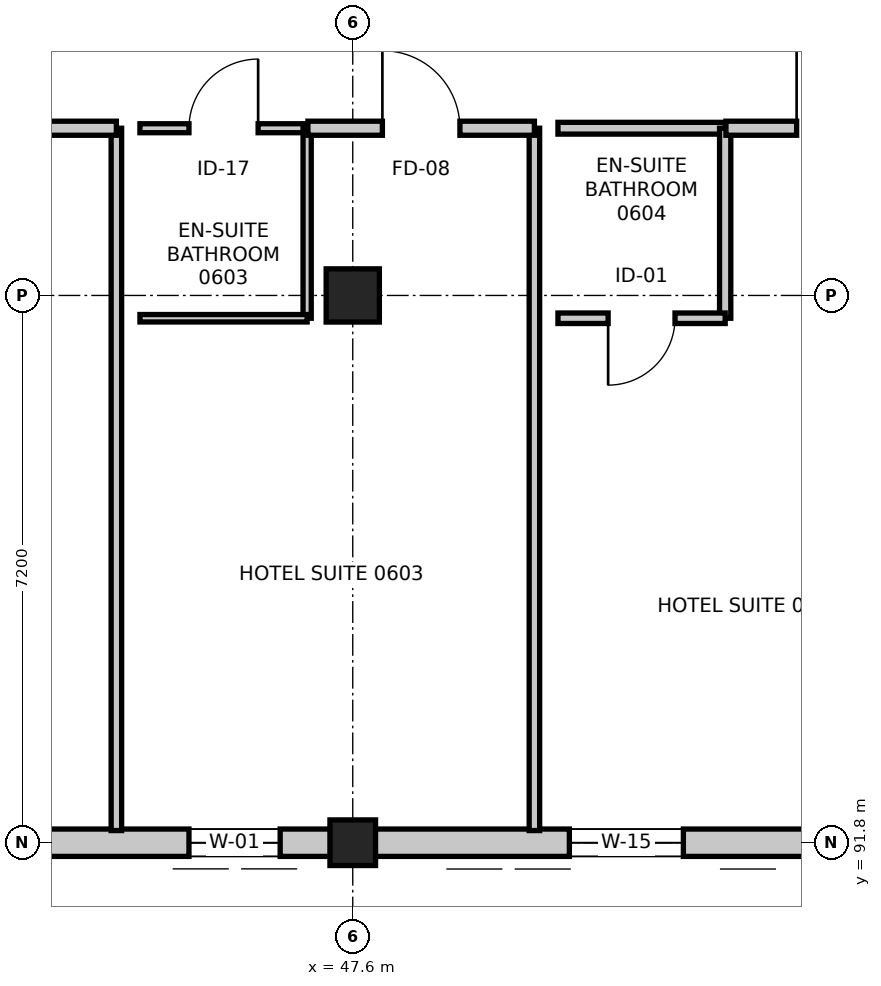
"""IFC4 building model, lengths in metres.
Left out: names, types, materials, properties, quantities, classifications, styles, units other than length and angle.
Written with IfcOpenShell. Run it as: python <this file> out.ifc"""

import sys

from ifc_helpers import new_model, si_unit, direction, frame, frame_2d, origin, origin_2d, place, context, subcontext, project, spatial, rectangle, extrude, element, fill, save


model = new_model("IFC4")
c1 = context("Model", 3, precision=1e-05, world=origin(), true_north=direction((0.0, 1.0)))
c2 = subcontext(c1, "Body", "Model", "MODEL_VIEW")
j1 = project(units=[si_unit("LENGTHUNIT", "METRE"), si_unit("PLANEANGLEUNIT", "RADIAN")], contexts=[c1])
p1 = place(None, origin())
s1 = spatial("IfcSite", under=j1, at=p1, CompositionType="ELEMENT")
p2 = place(p1, origin())
s2 = spatial("IfcBuilding", under=s1, at=p2, CompositionType="ELEMENT")
p3 = place(p2, frame((0.0, 0.0, 26.4)))
s3 = spatial("IfcBuildingStorey", under=s2, at=p3, CompositionType="ELEMENT", Elevation=26.4)
p4 = place(p3, frame((47.6, 91.8, 0.0), z_axis=(0.0, 0.0, 1.0), x_axis=(1.0, 0.0, 0.0)))
e1 = element("IfcColumn", 1, at=p4, inside=s3, PredefinedType="COLUMN", context=c2, shape_type="SweptSolid", body=[
    extrude(rectangle(XDim=0.6, YDim=0.6, at=origin_2d()), origin(), (0.0, 0.0, 1.0), 3.6),
])
p5 = place(p3, frame((47.6, 99.0, 0.0), z_axis=(0.0, 0.0, 1.0), x_axis=(1.0, 0.0, 0.0)))
e2 = element("IfcColumn", 2, at=p5, inside=s3, PredefinedType="COLUMN", context=c2, shape_type="SweptSolid", body=[
    extrude(rectangle(XDim=0.7, YDim=0.7, at=origin_2d()), origin(), (0.0, 0.0, 1.0), 3.6),
])
p6 = place(p3, frame((54.8, 91.8, 0.0), z_axis=(0.0, 0.0, 1.0), x_axis=(-1.0, 0.0, 0.0)))
e3 = element("IfcWall", 3, at=p6, inside=s3, PredefinedType="STANDARD", context=c2, shape_type="SweptSolid", body=[
    extrude(rectangle(XDim=7.2, YDim=0.36, at=frame_2d((3.6, 0.0))), origin(), (0.0, 0.0, 1.0), 2.735),
])
p7 = place(p6, frame((2.85, 0.0, 0.75)))
e4 = element("IfcOpeningElement", 4, at=p7, cuts=e3, PredefinedType="OPENING", context=c2, shape_type="SweptSolid", body=[
    extrude(rectangle(XDim=1.5, YDim=1.5, at=frame_2d((0.75, 0.75))), frame((0.0, 0.19, 0.0), z_axis=(0.0, -1.0, 0.0), x_axis=(1.0, 0.0, 0.0)), (0.0, 0.0, 1.0), 0.38),
])
p8 = place(p3, frame((47.6, 91.8, 0.0), z_axis=(0.0, 0.0, 1.0), x_axis=(-1.0, 0.0, 0.0)))
e5 = element("IfcWall", 5, at=p8, inside=s3, PredefinedType="STANDARD", context=c2, shape_type="SweptSolid", body=[
    extrude(rectangle(XDim=7.2, YDim=0.36, at=frame_2d((3.6, 0.0))), origin(), (0.0, 0.0, 1.0), 2.735),
])
p9 = place(p8, frame((0.955, 0.0, 0.75)))
e6 = element("IfcOpeningElement", 6, at=p9, cuts=e5, PredefinedType="OPENING", context=c2, shape_type="SweptSolid", body=[
    extrude(rectangle(XDim=1.2, YDim=1.5, at=frame_2d((0.6, 0.75))), frame((0.0, 0.19, 0.0), z_axis=(0.0, -1.0, 0.0), x_axis=(1.0, 0.0, 0.0)), (0.0, 0.0, 1.0), 0.38),
])
p10 = place(p8, frame((4.555, 0.0, 0.75)))
e7 = element("IfcOpeningElement", 7, at=p10, cuts=e5, PredefinedType="OPENING", context=c2, shape_type="SweptSolid", body=[
    extrude(rectangle(XDim=1.2, YDim=1.5, at=frame_2d((0.6, 0.75))), frame((0.0, 0.19, 0.0), z_axis=(0.0, -1.0, 0.0), x_axis=(1.0, 0.0, 0.0)), (0.0, 0.0, 1.0), 0.38),
])
p11 = place(p3, frame((44.49, 101.2, 0.0), z_axis=(0.0, 0.0, 1.0), x_axis=(0.0, -1.0, 0.0)))
e8 = element("IfcWall", 8, at=p11, inside=s3, PredefinedType="PARTITIONING", context=c2, shape_type="SweptSolid", body=[
    extrude(rectangle(XDim=9.24, YDim=0.138, at=frame_2d((4.62, 0.0))), origin(), (0.0, 0.0, 1.0), 2.735),
])
p12 = place(p3, frame((41.51, 101.2, 0.0), z_axis=(0.0, 0.0, 1.0), x_axis=(1.0, 0.0, 0.0)))
e9 = element("IfcWall", 9, at=p12, inside=s3, PredefinedType="PARTITIONING", context=c2, shape_type="SweptSolid", body=[
    extrude(rectangle(XDim=2.98, YDim=0.185, at=frame_2d((1.49, 0.0))), origin(), (0.0, 0.0, 1.0), 3.35),
])
p13 = place(p12, frame((1.015, 0.0, 0.0)))
e10 = element("IfcOpeningElement", 10, at=p13, cuts=e9, PredefinedType="OPENING", context=c2, shape_type="SweptSolid", body=[
    extrude(rectangle(XDim=0.95, YDim=2.1, at=frame_2d((0.475, 1.05))), frame((0.0, 0.103, 0.0), z_axis=(0.0, -1.0, 0.0), x_axis=(1.0, 0.0, 0.0)), (0.0, 0.0, 1.0), 0.205),
])
p14 = place(p3, frame((44.8, 101.2, 0.0), z_axis=(0.0, 0.0, 1.0), x_axis=(1.0, 0.0, 0.0)))
e11 = element("IfcWall", 11, at=p14, inside=s3, PredefinedType="PARTITIONING", context=c2, shape_type="SweptSolid", body=[
    extrude(rectangle(XDim=2.2, YDim=0.118, at=frame_2d((1.1, 0.0))), origin(), (0.0, 0.0, 1.0), 3.35),
])
p15 = place(p14, frame((0.645, 0.0, 0.0)))
e12 = element("IfcOpeningElement", 12, at=p15, cuts=e11, PredefinedType="OPENING", context=c2, shape_type="SweptSolid", body=[
    extrude(rectangle(XDim=0.91, YDim=2.11, at=frame_2d((0.455, 1.055))), frame((0.0, 0.069, 0.0), z_axis=(0.0, -1.0, 0.0), x_axis=(1.0, 0.0, 0.0)), (0.0, 0.0, 1.0), 0.138),
])
p16 = place(p3, frame((47.0, 101.2, 0.0), z_axis=(0.0, 0.0, 1.0), x_axis=(0.0, -1.0, 0.0)))
e13 = element("IfcWall", 13, at=p16, inside=s3, PredefinedType="PARTITIONING", context=c2, shape_type="SweptSolid", body=[
    extrude(rectangle(XDim=2.5, YDim=0.108, at=frame_2d((1.25, 0.0))), origin(), (0.0, 0.0, 1.0), 2.735),
])
p17 = place(p3, frame((47.0, 98.7, 0.0), z_axis=(0.0, 0.0, 1.0), x_axis=(-1.0, 0.0, 0.0)))
e14 = element("IfcWall", 14, at=p17, inside=s3, PredefinedType="PARTITIONING", context=c2, shape_type="SweptSolid", body=[
    extrude(rectangle(XDim=2.2, YDim=0.098, at=frame_2d((1.1, 0.0))), origin(), (0.0, 0.0, 1.0), 3.35),
])
p18 = place(p3, frame((49.99, 101.2, 0.0), z_axis=(0.0, 0.0, 1.0), x_axis=(0.0, -1.0, 0.0)))
e15 = element("IfcWall", 15, at=p18, inside=s3, PredefinedType="PARTITIONING", context=c2, shape_type="SweptSolid", body=[
    extrude(rectangle(XDim=9.24, YDim=0.138, at=frame_2d((4.62, 0.0))), origin(), (0.0, 0.0, 1.0), 2.735),
])
p19 = place(p3, frame((47.01, 101.2, 0.0), z_axis=(0.0, 0.0, 1.0), x_axis=(1.0, 0.0, 0.0)))
e16 = element("IfcWall", 16, at=p19, inside=s3, PredefinedType="PARTITIONING", context=c2, shape_type="SweptSolid", body=[
    extrude(rectangle(XDim=2.98, YDim=0.185, at=frame_2d((1.49, 0.0))), origin(), (0.0, 0.0, 1.0), 2.685),
])
p20 = place(p19, frame((0.98, 0.0, 0.0)))
e17 = element("IfcOpeningElement", 17, at=p20, cuts=e16, PredefinedType="OPENING", context=c2, shape_type="SweptSolid", body=[
    extrude(rectangle(XDim=1.02, YDim=2.15, at=frame_2d((0.51, 1.075))), frame((0.0, 0.103, 0.0), z_axis=(0.0, -1.0, 0.0), x_axis=(1.0, 0.0, 0.0)), (0.0, 0.0, 1.0), 0.205),
])
p21 = place(p3, frame((50.3, 101.2, 0.0), z_axis=(0.0, 0.0, 1.0), x_axis=(1.0, 0.0, 0.0)))
e18 = element("IfcWall", 18, at=p21, inside=s3, PredefinedType="PARTITIONING", context=c2, shape_type="SweptSolid", body=[
    extrude(rectangle(XDim=2.2, YDim=0.155, at=frame_2d((1.1, 0.0))), origin(), (0.0, 0.0, 1.0), 3.35),
])
p22 = place(p3, frame((52.5, 101.2, 0.0), z_axis=(0.0, 0.0, 1.0), x_axis=(0.0, -1.0, 0.0)))
e19 = element("IfcWall", 19, at=p22, inside=s3, PredefinedType="PARTITIONING", context=c2, shape_type="SweptSolid", body=[
    extrude(rectangle(XDim=2.5, YDim=0.148, at=frame_2d((1.25, 0.0))), origin(), (0.0, 0.0, 1.0), 2.735),
])
p23 = place(p3, frame((52.5, 98.7, 0.0), z_axis=(0.0, 0.0, 1.0), x_axis=(-1.0, 0.0, 0.0)))
e20 = element("IfcWall", 20, at=p23, inside=s3, PredefinedType="PARTITIONING", context=c2, shape_type="SweptSolid", body=[
    extrude(rectangle(XDim=2.2, YDim=0.138, at=frame_2d((1.1, 0.0))), origin(), (0.0, 0.0, 1.0), 3.35),
])
p24 = place(p23, frame((0.66, 0.0, 0.0)))
e21 = element("IfcOpeningElement", 21, at=p24, cuts=e20, PredefinedType="OPENING", context=c2, shape_type="SweptSolid", body=[
    extrude(rectangle(XDim=0.88, YDim=2.06, at=frame_2d((0.44, 1.03))), frame((0.0, 0.079, 0.0), z_axis=(0.0, -1.0, 0.0), x_axis=(1.0, 0.0, 0.0)), (0.0, 0.0, 1.0), 0.158),
])
p25 = place(p3, frame((52.51, 101.2, 0.0), z_axis=(0.0, 0.0, 1.0), x_axis=(1.0, 0.0, 0.0)))
e22 = element("IfcWall", 22, at=p25, inside=s3, PredefinedType="PARTITIONING", context=c2, shape_type="SweptSolid", body=[
    extrude(rectangle(XDim=2.98, YDim=0.185, at=frame_2d((1.49, 0.0))), origin(), (0.0, 0.0, 1.0), 2.685),
])
p26 = place(p25, frame((0.93, 0.0, 0.0)))
e23 = element("IfcOpeningElement", 23, at=p26, cuts=e22, PredefinedType="OPENING", context=c2, shape_type="SweptSolid", body=[
    extrude(rectangle(XDim=1.12, YDim=2.2, at=frame_2d((0.56, 1.1))), frame((0.0, 0.103, 0.0), z_axis=(0.0, -1.0, 0.0), x_axis=(1.0, 0.0, 0.0)), (0.0, 0.0, 1.0), 0.205),
])
p27 = place(p7, origin())
e24 = element("IfcWindow", 24, at=p27, inside=s3, PartitioningType="SINGLE_PANEL", PredefinedType="WINDOW", context=c2, shape_type="SweptSolid", body=[
    extrude(rectangle(XDim=1.5, YDim=1.5, at=frame_2d((0.75, 0.75))), frame((0.0, 0.03, 0.0), z_axis=(0.0, -1.0, 0.0), x_axis=(1.0, 0.0, 0.0)), (0.0, 0.0, 1.0), 0.06),
])
fill(e4, e24)
p28 = place(p9, origin())
e25 = element("IfcWindow", 25, at=p28, inside=s3, PartitioningType="SINGLE_PANEL", PredefinedType="WINDOW", context=c2, shape_type="SweptSolid", body=[
    extrude(rectangle(XDim=1.2, YDim=1.5, at=frame_2d((0.6, 0.75))), frame((0.0, 0.03, 0.0), z_axis=(0.0, -1.0, 0.0), x_axis=(1.0, 0.0, 0.0)), (0.0, 0.0, 1.0), 0.06),
])
fill(e6, e25)
p29 = place(p15, origin())
e26 = element("IfcDoor", 26, at=p29, inside=s3, OperationType="SINGLE_SWING_RIGHT", PredefinedType="DOOR", context=c2, shape_type="SweptSolid", body=[
    extrude(rectangle(XDim=0.91, YDim=2.11, at=frame_2d((0.455, 1.055))), frame((0.0, 0.025, 0.0), z_axis=(0.0, -1.0, 0.0), x_axis=(1.0, 0.0, 0.0)), (0.0, 0.0, 1.0), 0.05),
])
fill(e12, e26)
p30 = place(p20, origin())
e27 = element("IfcDoor", 27, at=p30, inside=s3, OperationType="SINGLE_SWING_LEFT", PredefinedType="DOOR", context=c2, shape_type="SweptSolid", body=[
    extrude(rectangle(XDim=1.02, YDim=2.15, at=frame_2d((0.51, 1.075))), frame((0.0, 0.025, 0.0), z_axis=(0.0, -1.0, 0.0), x_axis=(1.0, 0.0, 0.0)), (0.0, 0.0, 1.0), 0.05),
])
fill(e17, e27)
p31 = place(p24, origin())
e28 = element("IfcDoor", 28, at=p31, inside=s3, OperationType="SINGLE_SWING_RIGHT", PredefinedType="DOOR", context=c2, shape_type="SweptSolid", body=[
    extrude(rectangle(XDim=0.88, YDim=2.06, at=frame_2d((0.44, 1.03))), frame((0.0, 0.025, 0.0), z_axis=(0.0, -1.0, 0.0), x_axis=(1.0, 0.0, 0.0)), (0.0, 0.0, 1.0), 0.05),
])
fill(e21, e28)
p32 = place(p26, origin())
e29 = element("IfcDoor", 29, at=p32, inside=s3, OperationType="SINGLE_SWING_LEFT", PredefinedType="DOOR", context=c2, shape_type="SweptSolid", body=[
    extrude(rectangle(XDim=1.12, YDim=2.2, at=frame_2d((0.56, 1.1))), frame((0.0, 0.025, 0.0), z_axis=(0.0, -1.0, 0.0), x_axis=(1.0, 0.0, 0.0)), (0.0, 0.0, 1.0), 0.05),
])
fill(e23, e29)
save(model, sys.argv[1])
